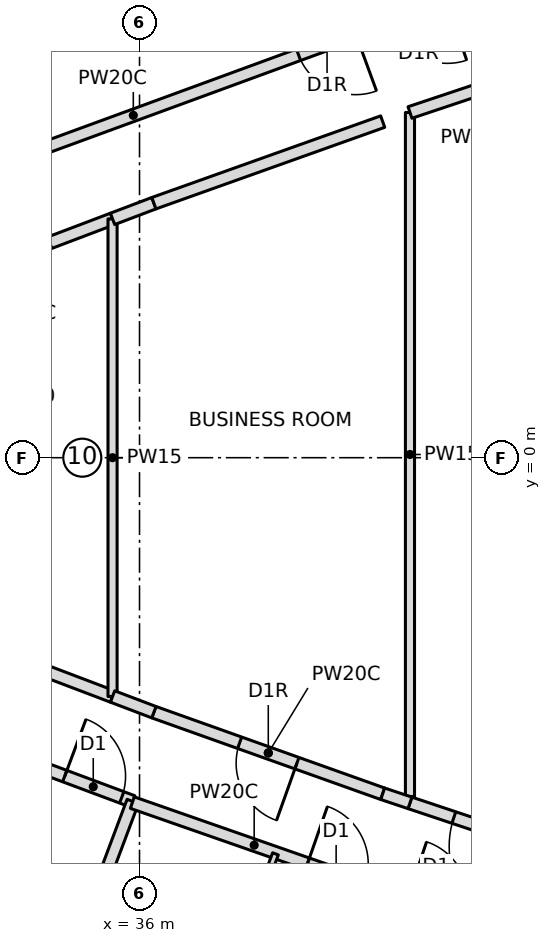
"""IFC4 building model, lengths in metres.
Left out: names, types, materials, properties, quantities, classifications, styles, units other than length and angle.
Written with IfcOpenShell. Run it as: python <this file> out.ifc"""

import sys

from ifc_helpers import new_model, si_unit, direction, frame, frame_2d, origin, place, context, subcontext, project, spatial, rectangle, extrude, element, fill, save


model = new_model("IFC4")
c1 = context("Model", 3, precision=1e-05, world=origin(), true_north=direction((0.0, 1.0)))
c2 = subcontext(c1, "Body", "Model", "MODEL_VIEW")
j1 = project(units=[si_unit("LENGTHUNIT", "METRE"), si_unit("PLANEANGLEUNIT", "RADIAN")], contexts=[c1])
p1 = place(None, origin())
s1 = spatial("IfcSite", under=j1, at=p1, CompositionType="ELEMENT")
p2 = place(p1, origin())
s2 = spatial("IfcBuilding", under=s1, at=p2, CompositionType="ELEMENT")
p3 = place(p2, frame((0.0, 0.0, 224.35)))
s3 = spatial("IfcBuildingStorey", under=s2, at=p3, CompositionType="ELEMENT", Elevation=224.35)
p4 = place(p3, frame((39.882, 7.091, 0.0), z_axis=(0.0, 0.0, 1.0), x_axis=(-0.938916907106, -0.344143925634, 0.0)))
e1 = element("IfcWall", 1, at=p4, inside=s3, PredefinedType="PARTITIONING", context=c2, shape_type="SweptSolid", body=[
    extrude(rectangle(XDim=8.488, YDim=0.2, at=frame_2d((4.244, 0.0))), origin(), (0.0, 0.0, 1.0), 3.25),
])
p5 = place(p4, frame((0.35, 0.0, 0.0)))
e2 = element("IfcOpeningElement", 2, at=p5, cuts=e1, PredefinedType="OPENING", context=c2, shape_type="SweptSolid", body=[
    extrude(rectangle(XDim=1.0, YDim=2.1, at=frame_2d((0.5, 1.05))), frame((0.0, 0.11, 0.0), z_axis=(0.0, -1.0, 0.0), x_axis=(1.0, 0.0, 0.0)), (0.0, 0.0, 1.0), 0.22),
])
p6 = place(p3, frame((31.913, -4.17, 0.0), z_axis=(0.0, 0.0, 1.0), x_axis=(0.936848300955, -0.349735987565, 0.0)))
e3 = element("IfcWall", 3, at=p6, inside=s3, PredefinedType="PARTITIONING", context=c2, shape_type="SweptSolid", body=[
    extrude(rectangle(XDim=4.244, YDim=0.2, at=frame_2d((2.122, 0.0))), origin(), (0.0, 0.0, 1.0), 3.25),
])
p7 = place(p6, frame((3.05, 0.0, 0.0)))
e4 = element("IfcOpeningElement", 4, at=p7, cuts=e3, PredefinedType="OPENING", context=c2, shape_type="SweptSolid", body=[
    extrude(rectangle(XDim=1.0, YDim=2.1, at=frame_2d((0.5, 1.05))), frame((0.0, 0.11, 0.0), z_axis=(0.0, -1.0, 0.0), x_axis=(1.0, 0.0, 0.0)), (0.0, 0.0, 1.0), 0.22),
])
p8 = place(p3, frame((32.483, -14.738, 0.0), z_axis=(0.0, 0.0, 1.0), x_axis=(0.351117925717, 0.936331246002, 0.0)))
e5 = element("IfcWall", 5, at=p8, inside=s3, PredefinedType="PARTITIONING", context=c2, shape_type="SweptSolid", body=[
    extrude(rectangle(XDim=9.701, YDim=0.2, at=frame_2d((4.851, 0.0))), origin(), (0.0, 0.0, 1.0), 3.25),
])
p9 = place(p3, frame((35.882, -5.673, 0.0), z_axis=(0.0, 0.0, 1.0), x_axis=(0.944107376821, -0.329638075823, 0.0)))
e6 = element("IfcWall", 6, at=p9, inside=s3, PredefinedType="PARTITIONING", context=c2, shape_type="SweptSolid", body=[
    extrude(rectangle(XDim=4.245, YDim=0.2, at=frame_2d((2.122, 0.0))), origin(), (0.0, 0.0, 1.0), 3.25),
])
p10 = place(p9, frame((3.05, 0.0, 0.0)))
e7 = element("IfcOpeningElement", 7, at=p10, cuts=e6, PredefinedType="OPENING", context=c2, shape_type="SweptSolid", body=[
    extrude(rectangle(XDim=1.0, YDim=2.1, at=frame_2d((0.5, 1.05))), frame((0.0, 0.11, 0.0), z_axis=(0.0, -1.0, 0.0), x_axis=(1.0, 0.0, 0.0)), (0.0, 0.0, 1.0), 0.22),
])
p11 = place(p3, frame((38.236, -6.516, 0.0), z_axis=(0.0, 0.0, 1.0), x_axis=(-0.351229183496, -0.936289517543, 0.0)))
e8 = element("IfcWall", 8, at=p11, inside=s3, PredefinedType="PARTITIONING", context=c2, shape_type="SweptSolid", body=[
    extrude(rectangle(XDim=2.277, YDim=0.1, at=frame_2d((1.139, 0.0))), origin(), (0.0, 0.0, 1.0), 3.25),
])
p12 = place(p3, frame((32.556, 2.789, 0.0), z_axis=(0.0, 0.0, 1.0), x_axis=(0.934971422854, 0.354723044706, 0.0)))
e9 = element("IfcWall", 9, at=p12, inside=s3, PredefinedType="PARTITIONING", context=c2, shape_type="SweptSolid", body=[
    extrude(rectangle(XDim=3.209, YDim=0.2, at=frame_2d((1.604, 0.0))), origin(), (0.0, 0.0, 1.0), 3.25),
])
p13 = place(p12, frame((1.104, 0.0, 0.0)))
e10 = element("IfcOpeningElement", 10, at=p13, cuts=e9, PredefinedType="OPENING", context=c2, shape_type="SweptSolid", body=[
    extrude(rectangle(XDim=1.0, YDim=2.1, at=frame_2d((0.5, 1.05))), frame((0.0, 0.11, 0.0), z_axis=(0.0, -1.0, 0.0), x_axis=(1.0, 0.0, 0.0)), (0.0, 0.0, 1.0), 0.22),
])
p14 = place(p3, frame((35.556, -3.927, 0.0), z_axis=(0.0, 0.0, 1.0), x_axis=(-0.934971422854, 0.354723044706, 0.0)))
e11 = element("IfcWall", 11, at=p14, inside=s3, PredefinedType="PARTITIONING", context=c2, shape_type="SweptSolid", body=[
    extrude(rectangle(XDim=3.209, YDim=0.2, at=frame_2d((1.604, 0.0))), origin(), (0.0, 0.0, 1.0), 3.25),
])
p15 = place(p3, frame((35.556, -3.927, 0.0), z_axis=(0.0, 0.0, 1.0), x_axis=(0.0, 1.0, 0.0)))
e12 = element("IfcWall", 12, at=p15, inside=s3, PredefinedType="PARTITIONING", context=c2, shape_type="SweptSolid", body=[
    extrude(rectangle(XDim=7.855, YDim=0.15, at=frame_2d((3.927, 0.0))), origin(), (0.0, 0.0, 1.0), 3.25),
])
p16 = place(p3, frame((39.999, -5.527, 0.0), z_axis=(0.0, 0.0, 1.0), x_axis=(-0.941909090846, 0.335867927288, 0.0)))
e13 = element("IfcWall", 13, at=p16, inside=s3, PredefinedType="PARTITIONING", context=c2, shape_type="SweptSolid", body=[
    extrude(rectangle(XDim=3.995, YDim=0.2, at=frame_2d((1.998, 0.0))), origin(), (0.0, 0.0, 1.0), 3.25),
])
p17 = place(p16, frame((1.498, 0.0, 0.0)))
e14 = element("IfcOpeningElement", 14, at=p17, cuts=e13, PredefinedType="OPENING", context=c2, shape_type="SweptSolid", body=[
    extrude(rectangle(XDim=1.0, YDim=2.1, at=frame_2d((0.5, 1.05))), frame((0.0, 0.11, 0.0), z_axis=(0.0, -1.0, 0.0), x_axis=(1.0, 0.0, 0.0)), (0.0, 0.0, 1.0), 0.22),
])
for number, where, z_axis, x_axis in (
    (15, (36.236, -4.186, 0.0), (0.0, 0.0, 1.0), (-0.935, 0.355, 0.0)),
    (16, (35.556, 3.927, 0.0), (0.0, 0.0, 1.0), (0.935, 0.355, 0.0)),
):
    element("IfcWall", number, at=place(p3, frame(where, z_axis=z_axis, x_axis=x_axis)), inside=s3, PredefinedType="PARTITIONING", context=c2, shape_type="SweptSolid", body=[
        extrude(rectangle(XDim=0.727, YDim=0.2, at=frame_2d((0.364, 0.0))), origin(), (0.0, 0.0, 1.0), 3.25),
    ])
p18 = place(p3, frame((36.236, 4.186, 0.0), z_axis=(0.0, 0.0, 1.0), x_axis=(0.941909090846, 0.335867927288, 0.0)))
e17 = element("IfcWall", 17, at=p18, inside=s3, PredefinedType="PARTITIONING", context=c2, shape_type="SweptSolid", body=[
    extrude(rectangle(XDim=3.995, YDim=0.2, at=frame_2d((1.998, 0.0))), origin(), (0.0, 0.0, 1.0), 3.25),
])
p19 = place(p3, frame((40.448, -5.572, 0.0), z_axis=(0.0, 0.0, 1.0), x_axis=(0.0, 1.0, 0.0)))
e18 = element("IfcWall", 18, at=p19, inside=s3, PredefinedType="PARTITIONING", context=c2, shape_type="SweptSolid", body=[
    extrude(rectangle(XDim=11.249, YDim=0.15, at=frame_2d((5.625, 0.0))), origin(), (0.0, 0.0, 1.0), 3.25),
])
p20 = place(p3, frame((43.788, -6.793, 0.0), z_axis=(0.0, 0.0, 1.0), x_axis=(-0.948475139593, 0.316851557632, 0.0)))
e19 = element("IfcWall", 19, at=p20, inside=s3, PredefinedType="PARTITIONING", context=c2, shape_type="SweptSolid", body=[
    extrude(rectangle(XDim=3.522, YDim=0.2, at=frame_2d((1.761, 0.0))), origin(), (0.0, 0.0, 1.0), 3.25),
])
p21 = place(p20, frame((1.261, 0.0, 0.0)))
e20 = element("IfcOpeningElement", 20, at=p21, cuts=e19, PredefinedType="OPENING", context=c2, shape_type="SweptSolid", body=[
    extrude(rectangle(XDim=1.5, YDim=2.1, at=frame_2d((0.75, 1.05))), frame((0.0, 0.11, 0.0), z_axis=(0.0, -1.0, 0.0), x_axis=(1.0, 0.0, 0.0)), (0.0, 0.0, 1.0), 0.22),
])
p22 = place(p3, frame((40.448, 5.677, 0.0), z_axis=(0.0, 0.0, 1.0), x_axis=(0.948475139593, 0.316851557632, 0.0)))
e21 = element("IfcWall", 21, at=p22, inside=s3, PredefinedType="PARTITIONING", context=c2, shape_type="SweptSolid", body=[
    extrude(rectangle(XDim=3.522, YDim=0.2, at=frame_2d((1.761, 0.0))), origin(), (0.0, 0.0, 1.0), 3.25),
])
p23 = place(p3, frame((40.448, -5.677, 0.0), z_axis=(0.0, 0.0, 1.0), x_axis=(-0.948424836926, 0.317002095739, 0.0)))
e22 = element("IfcWall", 22, at=p23, inside=s3, PredefinedType="PARTITIONING", context=c2, shape_type="SweptSolid", body=[
    extrude(rectangle(XDim=0.473, YDim=0.2, at=frame_2d((0.236, 0.0))), origin(), (0.0, 0.0, 1.0), 3.25),
])
p24 = place(p5, origin())
e23 = element("IfcDoor", 23, at=p24, inside=s3, OperationType="SINGLE_SWING_RIGHT", PredefinedType="DOOR", context=c2, shape_type="SweptSolid", body=[
    extrude(rectangle(XDim=1.0, YDim=2.1, at=frame_2d((0.5, 1.05))), frame((0.0, 0.025, 0.0), z_axis=(0.0, -1.0, 0.0), x_axis=(1.0, 0.0, 0.0)), (0.0, 0.0, 1.0), 0.05),
])
fill(e2, e23)
p25 = place(p7, origin())
e24 = element("IfcDoor", 24, at=p25, inside=s3, OperationType="SINGLE_SWING_LEFT", PredefinedType="DOOR", context=c2, shape_type="SweptSolid", body=[
    extrude(rectangle(XDim=1.0, YDim=2.1, at=frame_2d((0.5, 1.05))), frame((0.0, 0.025, 0.0), z_axis=(0.0, -1.0, 0.0), x_axis=(1.0, 0.0, 0.0)), (0.0, 0.0, 1.0), 0.05),
])
fill(e4, e24)
p26 = place(p10, origin())
e25 = element("IfcDoor", 25, at=p26, inside=s3, OperationType="SINGLE_SWING_LEFT", PredefinedType="DOOR", context=c2, shape_type="SweptSolid", body=[
    extrude(rectangle(XDim=1.0, YDim=2.1, at=frame_2d((0.5, 1.05))), frame((0.0, 0.025, 0.0), z_axis=(0.0, -1.0, 0.0), x_axis=(1.0, 0.0, 0.0)), (0.0, 0.0, 1.0), 0.05),
])
fill(e7, e25)
p27 = place(p17, origin())
e26 = element("IfcDoor", 26, at=p27, inside=s3, OperationType="SINGLE_SWING_RIGHT", PredefinedType="DOOR", context=c2, shape_type="SweptSolid", body=[
    extrude(rectangle(XDim=1.0, YDim=2.1, at=frame_2d((0.5, 1.05))), frame((0.0, 0.025, 0.0), z_axis=(0.0, -1.0, 0.0), x_axis=(1.0, 0.0, 0.0)), (0.0, 0.0, 1.0), 0.05),
])
fill(e14, e26)
p28 = place(p21, origin())
e27 = element("IfcDoor", 27, at=p28, inside=s3, OperationType="DOUBLE_DOOR_SINGLE_SWING", PredefinedType="DOOR", context=c2, shape_type="SweptSolid", body=[
    extrude(rectangle(XDim=1.5, YDim=2.1, at=frame_2d((0.75, 1.05))), frame((0.0, 0.025, 0.0), z_axis=(0.0, -1.0, 0.0), x_axis=(1.0, 0.0, 0.0)), (0.0, 0.0, 1.0), 0.05),
])
fill(e20, e27)
save(model, sys.argv[1])
